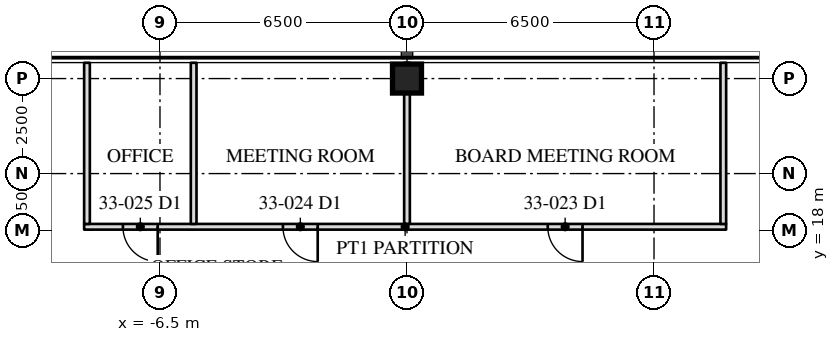
"""IFC4 building model, lengths in metres.
Left out: names, types, materials, properties, quantities, classifications, styles, units other than length and angle.
Written with IfcOpenShell. Run it as: python <this file> out.ifc"""

import sys

from ifc_helpers import new_model, si_unit, direction, frame, frame_2d, origin, origin_2d, place, context, subcontext, project, spatial, rectangle, hollow_rectangle, extrude, element, fill, save


model = new_model("IFC4")
c1 = context("Model", 3, precision=1e-05, world=origin(), true_north=direction((0.0, 1.0)))
c2 = subcontext(c1, "Body", "Model", "MODEL_VIEW")
j1 = project(units=[si_unit("LENGTHUNIT", "METRE"), si_unit("PLANEANGLEUNIT", "RADIAN")], contexts=[c1])
p1 = place(None, origin())
s1 = spatial("IfcSite", under=j1, at=p1, CompositionType="ELEMENT")
p2 = place(p1, origin())
s2 = spatial("IfcBuilding", under=s1, at=p2, CompositionType="ELEMENT")
p3 = place(p2, frame((0.0, 0.0, 141.8)))
s3 = spatial("IfcBuildingStorey", under=s2, at=p3, CompositionType="ELEMENT", Elevation=141.8)
p4 = place(p3, frame((0.0, 22.0, 0.0), z_axis=(0.0, 0.0, 1.0), x_axis=(1.0, 0.0, 0.0)))
e1 = element("IfcColumn", 1, at=p4, inside=s3, PredefinedType="COLUMN", context=c2, shape_type="SweptSolid", body=[
    extrude(hollow_rectangle(XDim=0.762, YDim=0.762, WallThickness=0.076, at=origin_2d()), origin(), (0.0, 0.0, 1.0), 4.1),
])
p5 = place(p3, frame((8.398, 18.1, 0.0), z_axis=(0.0, 0.0, 1.0), x_axis=(-1.0, 0.0, 0.0)))
e2 = element("IfcWall", 2, at=p5, inside=s3, PredefinedType="PARTITIONING", context=c2, shape_type="SweptSolid", body=[
    extrude(rectangle(XDim=16.894, YDim=0.15, at=frame_2d((8.447, 0.0))), origin(), (0.0, 0.0, 1.0), 3.91),
])
p6 = place(p5, frame((3.779, 0.0, 0.0)))
e3 = element("IfcOpeningElement", 3, at=p6, cuts=e2, PredefinedType="OPENING", context=c2, shape_type="SweptSolid", body=[
    extrude(rectangle(XDim=0.915, YDim=2.134, at=frame_2d((0.458, 1.067))), frame((0.0, 0.085, 0.0), z_axis=(0.0, -1.0, 0.0), x_axis=(1.0, 0.0, 0.0)), (0.0, 0.0, 1.0), 0.17),
])
p7 = place(p5, frame((10.748, 0.0, 0.0)))
e4 = element("IfcOpeningElement", 4, at=p7, cuts=e2, PredefinedType="OPENING", context=c2, shape_type="SweptSolid", body=[
    extrude(rectangle(XDim=0.915, YDim=2.134, at=frame_2d((0.458, 1.067))), frame((0.0, 0.085, 0.0), z_axis=(0.0, -1.0, 0.0), x_axis=(1.0, 0.0, 0.0)), (0.0, 0.0, 1.0), 0.17),
])
p8 = place(p5, frame((14.958, 0.0, 0.0)))
e5 = element("IfcOpeningElement", 5, at=p8, cuts=e2, PredefinedType="OPENING", context=c2, shape_type="SweptSolid", body=[
    extrude(rectangle(XDim=0.915, YDim=2.134, at=frame_2d((0.458, 1.067))), frame((0.0, 0.085, 0.0), z_axis=(0.0, -1.0, 0.0), x_axis=(1.0, 0.0, 0.0)), (0.0, 0.0, 1.0), 0.17),
])
p9 = place(p3, frame((8.323, 18.175, 0.0), z_axis=(0.0, 0.0, 1.0), x_axis=(0.0, 1.0, 0.0)))
e6 = element("IfcWall", 6, at=p9, inside=s3, PredefinedType="PARTITIONING", context=c2, shape_type="SweptSolid", body=[
    extrude(rectangle(XDim=4.24, YDim=0.15, at=frame_2d((2.12, 0.0))), origin(), (0.0, 0.0, 1.0), 3.91),
])
p10 = place(p3, frame((0.0, 18.175, 0.0), z_axis=(0.0, 0.0, 1.0), x_axis=(0.0, 1.0, 0.0)))
e7 = element("IfcWall", 7, at=p10, inside=s3, PredefinedType="PARTITIONING", context=c2, shape_type="SweptSolid", body=[
    extrude(rectangle(XDim=4.24, YDim=0.15, at=frame_2d((2.12, 0.0))), origin(), (0.0, 0.0, 1.0), 3.326),
])
for number, where, z_axis, x_axis in (
    (8, (-5.614, 18.175, 0.0), (0.0, 0.0, 1.0), (0.0, 1.0, 0.0)),
    (9, (-8.421, 18.175, 0.0), (0.0, 0.0, 1.0), (0.0, 1.0, 0.0)),
):
    element("IfcWall", number, at=place(p3, frame(where, z_axis=z_axis, x_axis=x_axis)), inside=s3, PredefinedType="PARTITIONING", context=c2, shape_type="SweptSolid", body=[
        extrude(rectangle(XDim=4.24, YDim=0.15, at=frame_2d((2.12, 0.0))), origin(), (0.0, 0.0, 1.0), 3.91),
    ])
p11 = place(p6, origin())
e10 = element("IfcDoor", 10, at=p11, inside=s3, OperationType="SINGLE_SWING_LEFT", PredefinedType="DOOR", context=c2, shape_type="SweptSolid", body=[
    extrude(rectangle(XDim=0.915, YDim=2.134, at=frame_2d((0.458, 1.067))), frame((0.0, 0.025, 0.0), z_axis=(0.0, -1.0, 0.0), x_axis=(1.0, 0.0, 0.0)), (0.0, 0.0, 1.0), 0.05),
])
fill(e3, e10)
p12 = place(p7, origin())
e11 = element("IfcDoor", 11, at=p12, inside=s3, OperationType="SINGLE_SWING_LEFT", PredefinedType="DOOR", context=c2, shape_type="SweptSolid", body=[
    extrude(rectangle(XDim=0.915, YDim=2.134, at=frame_2d((0.458, 1.067))), frame((0.0, 0.025, 0.0), z_axis=(0.0, -1.0, 0.0), x_axis=(1.0, 0.0, 0.0)), (0.0, 0.0, 1.0), 0.05),
])
fill(e4, e11)
p13 = place(p8, origin())
e12 = element("IfcDoor", 12, at=p13, inside=s3, OperationType="SINGLE_SWING_LEFT", PredefinedType="DOOR", context=c2, shape_type="SweptSolid", body=[
    extrude(rectangle(XDim=0.915, YDim=2.134, at=frame_2d((0.458, 1.067))), frame((0.0, 0.025, 0.0), z_axis=(0.0, -1.0, 0.0), x_axis=(1.0, 0.0, 0.0)), (0.0, 0.0, 1.0), 0.05),
])
fill(e5, e12)
save(model, sys.argv[1])
